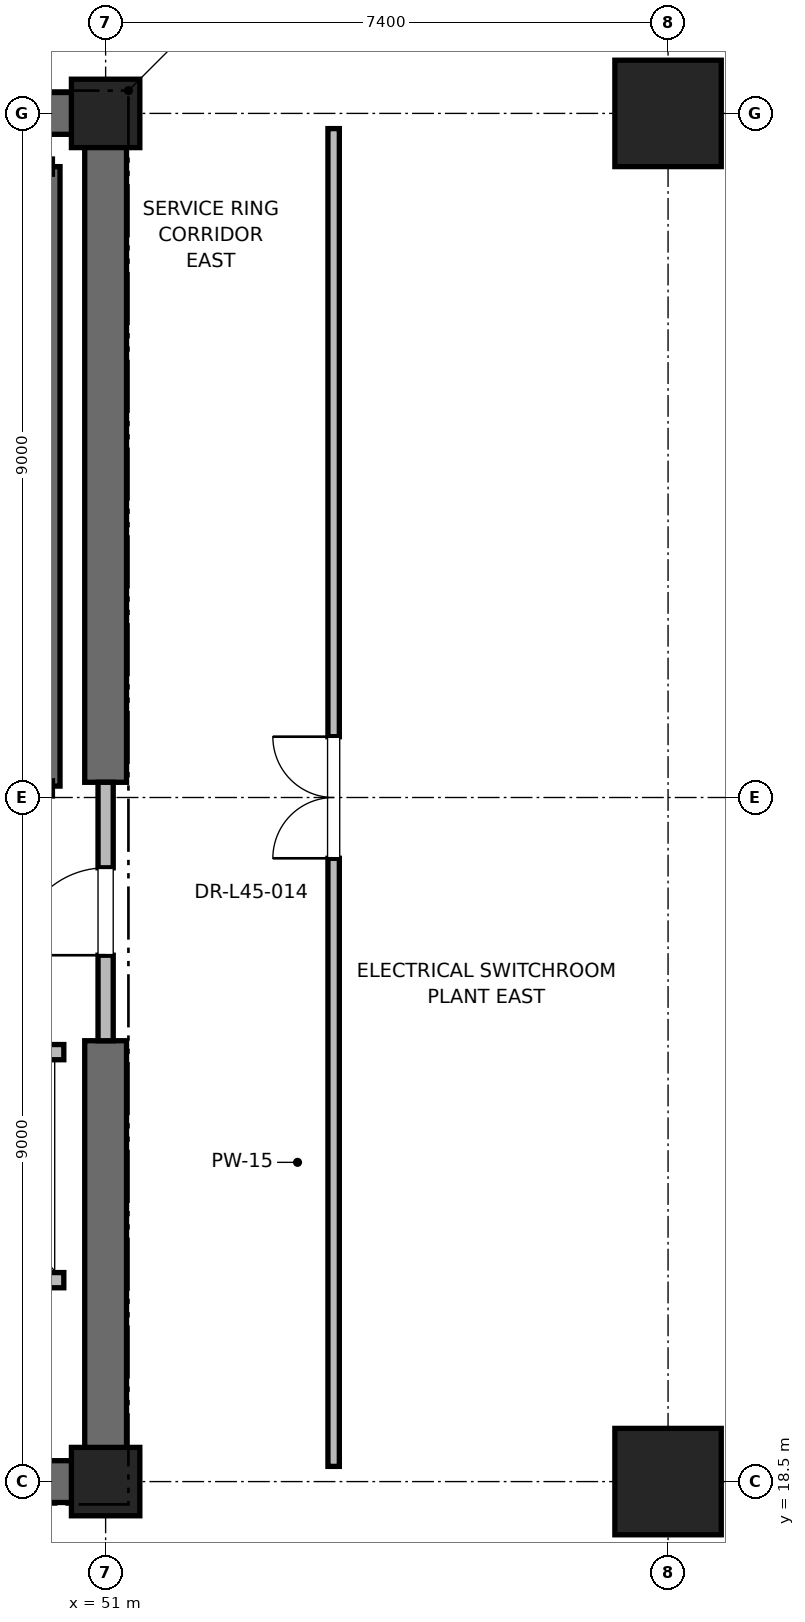
"""IFC4 building model, lengths in metres.
Left out: names, types, materials, properties, quantities, classifications, styles, units other than length and angle.
Written with IfcOpenShell. Run it as: python <this file> out.ifc"""

import sys

from ifc_helpers import new_model, si_unit, direction, frame, frame_2d, origin, origin_2d, place, context, subcontext, project, spatial, rectangle, extrude, element, fill, save


model = new_model("IFC4")
c1 = context("Model", 3, precision=1e-05, world=origin(), true_north=direction((0.0, 1.0)))
c2 = subcontext(c1, "Body", "Model", "MODEL_VIEW")
j1 = project(units=[si_unit("LENGTHUNIT", "METRE"), si_unit("PLANEANGLEUNIT", "RADIAN")], contexts=[c1])
p1 = place(None, origin())
s1 = spatial("IfcSite", under=j1, at=p1, CompositionType="ELEMENT")
p2 = place(p1, origin())
s2 = spatial("IfcBuilding", under=s1, at=p2, CompositionType="ELEMENT")
p3 = place(p2, frame((0.0, 0.0, 194.8)))
s3 = spatial("IfcBuildingStorey", under=s2, at=p3, CompositionType="ELEMENT", Elevation=194.8)
for number, where, z_axis, x_axis in (
    (1, (58.4, 18.5, 0.0), (0.0, 0.0, 1.0), (1.0, 0.0, 0.0)),
    (2, (58.4, 36.5, 0.0), (0.0, 0.0, 1.0), (1.0, 0.0, 0.0)),
):
    element("IfcColumn", number, at=place(p3, frame(where, z_axis=z_axis, x_axis=x_axis)), inside=s3, PredefinedType="COLUMN", context=c2, shape_type="SweptSolid", body=[
        extrude(rectangle(XDim=1.4, YDim=1.4, at=origin_2d()), origin(), (0.0, 0.0, 1.0), 5.4),
    ])
for number, where, z_axis, x_axis in (
    (3, (51.0, 18.5, 0.0), (0.0, 0.0, 1.0), (1.0, 0.0, 0.0)),
    (4, (51.0, 36.5, 0.0), (0.0, 0.0, 1.0), (1.0, 0.0, 0.0)),
):
    element("IfcColumn", number, at=place(p3, frame(where, z_axis=z_axis, x_axis=x_axis)), inside=s3, PredefinedType="PILASTER", context=c2, shape_type="SweptSolid", body=[
        extrude(rectangle(XDim=0.9, YDim=0.9, at=origin_2d()), origin(), (0.0, 0.0, 1.0), 5.4),
    ])
p4 = place(p3, frame((41.8, 18.5, 0.0), z_axis=(0.0, 0.0, 1.0), x_axis=(1.0, 0.0, 0.0)))
e5 = element("IfcWall", 5, at=p4, inside=s3, PredefinedType="SHEAR", context=c2, shape_type="SweptSolid", body=[
    extrude(rectangle(XDim=9.2, YDim=0.55, at=frame_2d((4.6, 0.0))), origin(), (0.0, 0.0, 1.0), 5.1),
])
for number, where, z_axis, x_axis in (
    (6, (45.2, 36.5, 0.0), (0.0, 0.0, 1.0), (1.0, 0.0, 0.0)),
    (7, (51.0, 18.5, 0.0), (0.0, 0.0, 1.0), (0.0, 1.0, 0.0)),
):
    element("IfcWall", number, at=place(p3, frame(where, z_axis=z_axis, x_axis=x_axis)), inside=s3, PredefinedType="SHEAR", context=c2, shape_type="SweptSolid", body=[
        extrude(rectangle(XDim=5.8, YDim=0.55, at=frame_2d((2.9, 0.0))), origin(), (0.0, 0.0, 1.0), 5.1),
    ])
p5 = place(p3, frame((51.0, 27.7, 0.0), z_axis=(0.0, 0.0, 1.0), x_axis=(0.0, 1.0, 0.0)))
e8 = element("IfcWall", 8, at=p5, inside=s3, PredefinedType="SHEAR", context=c2, shape_type="SweptSolid", body=[
    extrude(rectangle(XDim=8.8, YDim=0.55, at=frame_2d((4.4, 0.0))), origin(), (0.0, 0.0, 1.0), 5.1),
])
p6 = place(p3, frame((50.3, 27.65, 0.0), z_axis=(0.0, 0.0, 1.0), x_axis=(0.0, 1.0, 0.0)))
e9 = element("IfcWall", 9, at=p6, inside=s3, PredefinedType="SOLIDWALL", context=c2, shape_type="SweptSolid", body=[
    extrude(rectangle(XDim=8.15, YDim=0.2, at=frame_2d((4.075, 0.0))), origin(), (0.0, 0.0, 1.0), 5.1),
])
p7 = place(p3, frame((51.0, 24.3, 0.0), z_axis=(0.0, 0.0, 1.0), x_axis=(0.0, 1.0, 0.0)))
e10 = element("IfcWall", 10, at=p7, inside=s3, PredefinedType="PARTITIONING", context=c2, shape_type="SweptSolid", body=[
    extrude(rectangle(XDim=3.4, YDim=0.2, at=frame_2d((1.7, 0.0))), origin(), (0.0, 0.0, 1.0), 4.08),
])
p8 = place(p7, frame((1.125, 0.0, 0.0)))
e11 = element("IfcOpeningElement", 11, at=p8, cuts=e10, PredefinedType="OPENING", context=c2, shape_type="SweptSolid", body=[
    extrude(rectangle(XDim=1.15, YDim=2.2, at=frame_2d((0.575, 1.1))), frame((0.0, 0.1, 0.0), z_axis=(0.0, -1.0, 0.0), x_axis=(1.0, 0.0, 0.0)), (0.0, 0.0, 1.0), 0.2),
])
p9 = place(p3, frame((47.85, 21.15, 0.0), z_axis=(0.0, 0.0, 1.0), x_axis=(1.0, 0.0, 0.0)))
e12 = element("IfcWall", 12, at=p9, inside=s3, PredefinedType="SOLIDWALL", context=c2, shape_type="SweptSolid", body=[
    extrude(rectangle(XDim=2.6, YDim=0.2, at=frame_2d((1.3, 0.0))), origin(), (0.0, 0.0, 1.0), 5.1),
])
p10 = place(p3, frame((50.45, 24.15, 0.0), z_axis=(0.0, 0.0, 1.0), x_axis=(-1.0, 0.0, 0.0)))
e13 = element("IfcWall", 13, at=p10, inside=s3, PredefinedType="SOLIDWALL", context=c2, shape_type="SweptSolid", body=[
    extrude(rectangle(XDim=2.6, YDim=0.2, at=frame_2d((1.3, 0.0))), origin(), (0.0, 0.0, 1.0), 4.08),
])
p11 = place(p10, frame((0.75, 0.0, 0.0)))
e14 = element("IfcOpeningElement", 14, at=p11, cuts=e13, PredefinedType="OPENING", context=c2, shape_type="SweptSolid", body=[
    extrude(rectangle(XDim=1.1, YDim=2.2, at=frame_2d((0.55, 1.1))), frame((0.0, 0.1, 0.0), z_axis=(0.0, -1.0, 0.0), x_axis=(1.0, 0.0, 0.0)), (0.0, 0.0, 1.0), 0.2),
])
p12 = place(p3, frame((54.0, 18.7, 0.0), z_axis=(0.0, 0.0, 1.0), x_axis=(0.0, 1.0, 0.0)))
e15 = element("IfcWall", 15, at=p12, inside=s3, PredefinedType="PARTITIONING", context=c2, shape_type="SweptSolid", body=[
    extrude(rectangle(XDim=17.6, YDim=0.15, at=frame_2d((8.8, 0.0))), origin(), (0.0, 0.0, 1.0), 2.85),
])
p13 = place(p12, frame((8.0, 0.0, 0.0)))
e16 = element("IfcOpeningElement", 16, at=p13, cuts=e15, PredefinedType="OPENING", context=c2, shape_type="SweptSolid", body=[
    extrude(rectangle(XDim=1.6, YDim=2.25, at=frame_2d((0.8, 1.125))), frame((0.0, 0.075, 0.0), z_axis=(0.0, -1.0, 0.0), x_axis=(1.0, 0.0, 0.0)), (0.0, 0.0, 1.0), 0.15),
])
p14 = place(p8, origin())
e17 = element("IfcDoor", 17, at=p14, inside=s3, OperationType="SINGLE_SWING_LEFT", PredefinedType="DOOR", context=c2, shape_type="SweptSolid", body=[
    extrude(rectangle(XDim=1.15, YDim=2.2, at=frame_2d((0.575, 1.1))), frame((0.0, 0.025, 0.0), z_axis=(0.0, -1.0, 0.0), x_axis=(1.0, 0.0, 0.0)), (0.0, 0.0, 1.0), 0.05),
])
fill(e11, e17)
p15 = place(p13, origin())
e18 = element("IfcDoor", 18, at=p15, inside=s3, OperationType="DOUBLE_DOOR_SINGLE_SWING", PredefinedType="DOOR", context=c2, shape_type="SweptSolid", body=[
    extrude(rectangle(XDim=1.6, YDim=2.25, at=frame_2d((0.8, 1.125))), frame((0.0, 0.025, 0.0), z_axis=(0.0, -1.0, 0.0), x_axis=(1.0, 0.0, 0.0)), (0.0, 0.0, 1.0), 0.05),
])
fill(e16, e18)
save(model, sys.argv[1])
